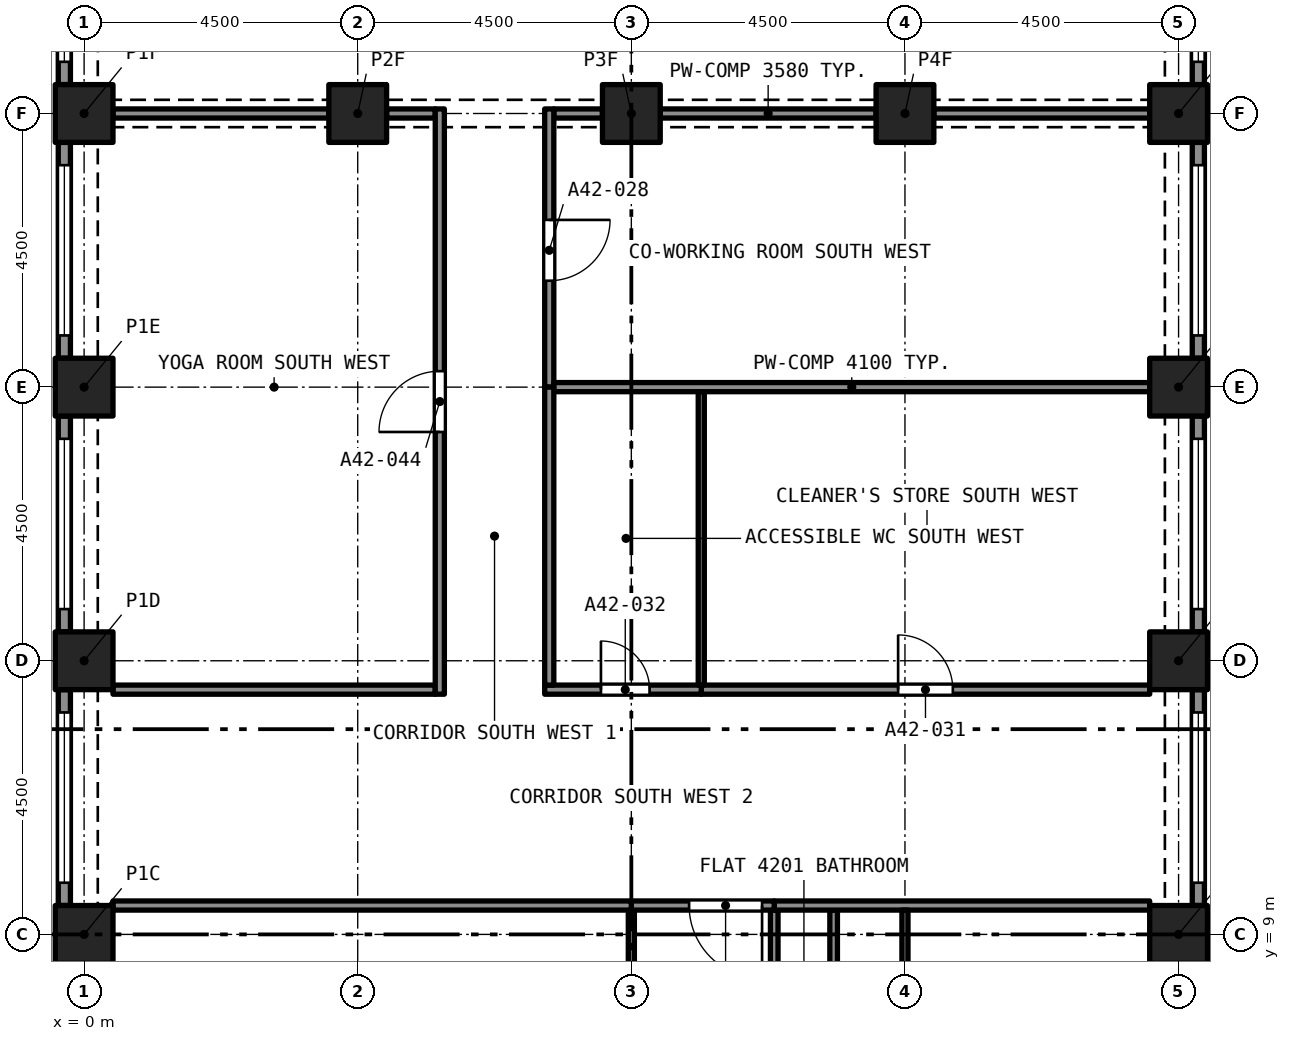
"""IFC4 building model, lengths in metres.
Left out: names, types, materials, properties, quantities, classifications, styles, units other than length and angle.
Written with IfcOpenShell. Run it as: python <this file> out.ifc"""

import sys

from ifc_helpers import new_model, si_unit, direction, frame, frame_2d, origin, origin_2d, place, context, subcontext, project, spatial, rectangle, extrude, element, fill, save


model = new_model("IFC4")
c1 = context("Model", 3, precision=1e-05, world=origin(), true_north=direction((0.0, 1.0)))
c2 = subcontext(c1, "Body", "Model", "MODEL_VIEW")
j1 = project(units=[si_unit("LENGTHUNIT", "METRE"), si_unit("PLANEANGLEUNIT", "RADIAN")], contexts=[c1])
p1 = place(None, origin())
s1 = spatial("IfcSite", under=j1, at=p1, CompositionType="ELEMENT")
p2 = place(p1, origin())
s2 = spatial("IfcBuilding", under=s1, at=p2, CompositionType="ELEMENT")
p3 = place(p2, frame((0.0, 0.0, 150.6)))
s3 = spatial("IfcBuildingStorey", under=s2, at=p3, CompositionType="ELEMENT", Elevation=150.6)
for number, where, z_axis, x_axis in (
    (1, (0.0, 9.0, 0.0), (0.0, 0.0, 1.0), (1.0, 0.0, 0.0)),
    (2, (18.0, 9.0, 0.0), (0.0, 0.0, 1.0), (1.0, 0.0, 0.0)),
    (3, (0.0, 13.5, 0.0), (0.0, 0.0, 1.0), (1.0, 0.0, 0.0)),
    (4, (18.0, 13.5, 0.0), (0.0, 0.0, 1.0), (1.0, 0.0, 0.0)),
    (5, (0.0, 18.0, 0.0), (0.0, 0.0, 1.0), (1.0, 0.0, 0.0)),
    (6, (18.0, 18.0, 0.0), (0.0, 0.0, 1.0), (1.0, 0.0, 0.0)),
    (7, (0.0, 22.5, 0.0), (0.0, 0.0, 1.0), (1.0, 0.0, 0.0)),
    (8, (4.5, 22.5, 0.0), (0.0, 0.0, 1.0), (1.0, 0.0, 0.0)),
    (9, (9.0, 22.5, 0.0), (0.0, 0.0, 1.0), (1.0, 0.0, 0.0)),
    (10, (13.5, 22.5, 0.0), (0.0, 0.0, 1.0), (1.0, 0.0, 0.0)),
    (11, (18.0, 22.5, 0.0), (0.0, 0.0, 1.0), (1.0, 0.0, 0.0)),
):
    element("IfcColumn", number, at=place(p3, frame(where, z_axis=z_axis, x_axis=x_axis)), inside=s3, PredefinedType="COLUMN", context=c2, shape_type="SweptSolid", body=[
        extrude(rectangle(XDim=0.95, YDim=0.95, at=origin_2d()), origin(), (0.0, 0.0, 1.0), 4.4),
    ])
p4 = place(p3, frame((-0.325, 22.975, 0.0), z_axis=(0.0, 0.0, 1.0), x_axis=(0.0, 1.0, 0.0)))
e12 = element("IfcWall", 12, at=p4, inside=s3, PredefinedType="SOLIDWALL", context=c2, shape_type="SweptSolid", body=[
    extrude(rectangle(XDim=3.55, YDim=0.2, at=frame_2d((1.775, 0.0))), origin(), (0.0, 0.0, 1.0), 4.4),
])
p5 = place(p4, frame((0.375, 0.0, 0.45)))
e13 = element("IfcOpeningElement", 13, at=p5, cuts=e12, PredefinedType="OPENING", context=c2, shape_type="SweptSolid", body=[
    extrude(rectangle(XDim=2.8, YDim=2.55, at=frame_2d((1.4, 1.275))), frame((0.0, 0.11, 0.0), z_axis=(0.0, -1.0, 0.0), x_axis=(1.0, 0.0, 0.0)), (0.0, 0.0, 1.0), 0.22),
])
p6 = place(p3, frame((-0.325, 18.475, 0.0), z_axis=(0.0, 0.0, 1.0), x_axis=(0.0, 1.0, 0.0)))
e14 = element("IfcWall", 14, at=p6, inside=s3, PredefinedType="SOLIDWALL", context=c2, shape_type="SweptSolid", body=[
    extrude(rectangle(XDim=3.55, YDim=0.2, at=frame_2d((1.775, 0.0))), origin(), (0.0, 0.0, 1.0), 4.4),
])
p7 = place(p6, frame((0.375, 0.0, 0.45)))
e15 = element("IfcOpeningElement", 15, at=p7, cuts=e14, PredefinedType="OPENING", context=c2, shape_type="SweptSolid", body=[
    extrude(rectangle(XDim=2.8, YDim=2.55, at=frame_2d((1.4, 1.275))), frame((0.0, 0.11, 0.0), z_axis=(0.0, -1.0, 0.0), x_axis=(1.0, 0.0, 0.0)), (0.0, 0.0, 1.0), 0.22),
])
p8 = place(p3, frame((-0.325, 13.975, 0.0), z_axis=(0.0, 0.0, 1.0), x_axis=(0.0, 1.0, 0.0)))
e16 = element("IfcWall", 16, at=p8, inside=s3, PredefinedType="SOLIDWALL", context=c2, shape_type="SweptSolid", body=[
    extrude(rectangle(XDim=3.55, YDim=0.2, at=frame_2d((1.775, 0.0))), origin(), (0.0, 0.0, 1.0), 4.4),
])
p9 = place(p8, frame((0.375, 0.0, 0.45)))
e17 = element("IfcOpeningElement", 17, at=p9, cuts=e16, PredefinedType="OPENING", context=c2, shape_type="SweptSolid", body=[
    extrude(rectangle(XDim=2.8, YDim=2.55, at=frame_2d((1.4, 1.275))), frame((0.0, 0.11, 0.0), z_axis=(0.0, -1.0, 0.0), x_axis=(1.0, 0.0, 0.0)), (0.0, 0.0, 1.0), 0.22),
])
p10 = place(p3, frame((-0.325, 9.475, 0.0), z_axis=(0.0, 0.0, 1.0), x_axis=(0.0, 1.0, 0.0)))
e18 = element("IfcWall", 18, at=p10, inside=s3, PredefinedType="SOLIDWALL", context=c2, shape_type="SweptSolid", body=[
    extrude(rectangle(XDim=3.55, YDim=0.2, at=frame_2d((1.775, 0.0))), origin(), (0.0, 0.0, 1.0), 4.4),
])
p11 = place(p10, frame((0.375, 0.0, 0.45)))
e19 = element("IfcOpeningElement", 19, at=p11, cuts=e18, PredefinedType="OPENING", context=c2, shape_type="SweptSolid", body=[
    extrude(rectangle(XDim=2.8, YDim=2.55, at=frame_2d((1.4, 1.275))), frame((0.0, 0.11, 0.0), z_axis=(0.0, -1.0, 0.0), x_axis=(1.0, 0.0, 0.0)), (0.0, 0.0, 1.0), 0.22),
])
p12 = place(p3, frame((18.325, 13.025, 0.0), z_axis=(0.0, 0.0, 1.0), x_axis=(0.0, -1.0, 0.0)))
e20 = element("IfcWall", 20, at=p12, inside=s3, PredefinedType="SOLIDWALL", context=c2, shape_type="SweptSolid", body=[
    extrude(rectangle(XDim=3.55, YDim=0.2, at=frame_2d((1.775, 0.0))), origin(), (0.0, 0.0, 1.0), 4.4),
])
p13 = place(p12, frame((0.375, 0.0, 0.45)))
e21 = element("IfcOpeningElement", 21, at=p13, cuts=e20, PredefinedType="OPENING", context=c2, shape_type="SweptSolid", body=[
    extrude(rectangle(XDim=2.8, YDim=2.55, at=frame_2d((1.4, 1.275))), frame((0.0, 0.11, 0.0), z_axis=(0.0, -1.0, 0.0), x_axis=(1.0, 0.0, 0.0)), (0.0, 0.0, 1.0), 0.22),
])
p14 = place(p3, frame((18.325, 17.525, 0.0), z_axis=(0.0, 0.0, 1.0), x_axis=(0.0, -1.0, 0.0)))
e22 = element("IfcWall", 22, at=p14, inside=s3, PredefinedType="SOLIDWALL", context=c2, shape_type="SweptSolid", body=[
    extrude(rectangle(XDim=3.55, YDim=0.2, at=frame_2d((1.775, 0.0))), origin(), (0.0, 0.0, 1.0), 4.4),
])
p15 = place(p14, frame((0.375, 0.0, 0.45)))
e23 = element("IfcOpeningElement", 23, at=p15, cuts=e22, PredefinedType="OPENING", context=c2, shape_type="SweptSolid", body=[
    extrude(rectangle(XDim=2.8, YDim=2.55, at=frame_2d((1.4, 1.275))), frame((0.0, 0.11, 0.0), z_axis=(0.0, -1.0, 0.0), x_axis=(1.0, 0.0, 0.0)), (0.0, 0.0, 1.0), 0.22),
])
p16 = place(p3, frame((18.325, 22.025, 0.0), z_axis=(0.0, 0.0, 1.0), x_axis=(0.0, -1.0, 0.0)))
e24 = element("IfcWall", 24, at=p16, inside=s3, PredefinedType="SOLIDWALL", context=c2, shape_type="SweptSolid", body=[
    extrude(rectangle(XDim=3.55, YDim=0.2, at=frame_2d((1.775, 0.0))), origin(), (0.0, 0.0, 1.0), 4.4),
])
p17 = place(p16, frame((0.375, 0.0, 0.45)))
e25 = element("IfcOpeningElement", 25, at=p17, cuts=e24, PredefinedType="OPENING", context=c2, shape_type="SweptSolid", body=[
    extrude(rectangle(XDim=2.8, YDim=2.55, at=frame_2d((1.4, 1.275))), frame((0.0, 0.11, 0.0), z_axis=(0.0, -1.0, 0.0), x_axis=(1.0, 0.0, 0.0)), (0.0, 0.0, 1.0), 0.22),
])
p18 = place(p3, frame((18.325, 26.525, 0.0), z_axis=(0.0, 0.0, 1.0), x_axis=(0.0, -1.0, 0.0)))
e26 = element("IfcWall", 26, at=p18, inside=s3, PredefinedType="SOLIDWALL", context=c2, shape_type="SweptSolid", body=[
    extrude(rectangle(XDim=3.55, YDim=0.2, at=frame_2d((1.775, 0.0))), origin(), (0.0, 0.0, 1.0), 4.4),
])
p19 = place(p18, frame((0.375, 0.0, 0.45)))
e27 = element("IfcOpeningElement", 27, at=p19, cuts=e26, PredefinedType="OPENING", context=c2, shape_type="SweptSolid", body=[
    extrude(rectangle(XDim=2.8, YDim=2.55, at=frame_2d((1.4, 1.275))), frame((0.0, 0.11, 0.0), z_axis=(0.0, -1.0, 0.0), x_axis=(1.0, 0.0, 0.0)), (0.0, 0.0, 1.0), 0.22),
])
p20 = place(p3, frame((11.35, 9.4, 0.0), z_axis=(0.0, 0.0, 1.0), x_axis=(0.0, -1.0, 0.0)))
e28 = element("IfcWall", 28, at=p20, inside=s3, PredefinedType="PARTITIONING", context=c2, shape_type="SweptSolid", body=[
    extrude(rectangle(XDim=3.448, YDim=0.125, at=frame_2d((1.724, 0.0))), origin(), (0.0, 0.0, 1.0), 4.1),
])
p21 = place(p20, frame((2.465, 0.0, 0.0)))
e29 = element("IfcOpeningElement", 29, at=p21, cuts=e28, PredefinedType="OPENING", context=c2, shape_type="SweptSolid", body=[
    extrude(rectangle(XDim=0.8, YDim=2.1, at=frame_2d((0.4, 1.05))), frame((0.0, 0.073, 0.0), z_axis=(0.0, -1.0, 0.0), x_axis=(1.0, 0.0, 0.0)), (0.0, 0.0, 1.0), 0.145),
])
p22 = place(p3, frame((12.327, 6.077, 0.0), z_axis=(0.0, 0.0, 1.0), x_axis=(0.0, 1.0, 0.0)))
e30 = element("IfcWall", 30, at=p22, inside=s3, PredefinedType="PARTITIONING", context=c2, shape_type="SweptSolid", body=[
    extrude(rectangle(XDim=3.323, YDim=0.125, at=frame_2d((1.661, 0.0))), origin(), (0.0, 0.0, 1.0), 4.1),
])
p23 = place(p3, frame((11.35, 9.475, 0.0), z_axis=(0.0, 0.0, 1.0), x_axis=(1.0, 0.0, 0.0)))
e31 = element("IfcWall", 31, at=p23, inside=s3, PredefinedType="PARTITIONING", context=c2, shape_type="SweptSolid", body=[
    extrude(rectangle(XDim=6.175, YDim=0.15, at=frame_2d((3.087, 0.0))), origin(), (0.0, 0.0, 1.0), 4.1),
])
p24 = place(p3, frame((13.5, 6.015, 0.0), z_axis=(0.0, 0.0, 1.0), x_axis=(0.0, 1.0, 0.0)))
e32 = element("IfcWall", 32, at=p24, inside=s3, PredefinedType="PARTITIONING", context=c2, shape_type="SweptSolid", body=[
    extrude(rectangle(XDim=3.385, YDim=0.1, at=frame_2d((1.692, 0.0))), origin(), (0.0, 0.0, 1.0), 4.1),
])
p25 = place(p3, frame((9.0, 4.675, 0.0), z_axis=(0.0, 0.0, 1.0), x_axis=(0.0, 1.0, 0.0)))
e33 = element("IfcWall", 33, at=p25, inside=s3, PredefinedType="PARTITIONING", context=c2, shape_type="SweptSolid", body=[
    extrude(rectangle(XDim=4.725, YDim=0.1, at=frame_2d((2.362, 0.0))), origin(), (0.0, 0.0, 1.0), 4.1),
])
p26 = place(p25, frame((0.13, 0.0, 0.0)))
e34 = element("IfcOpeningElement", 34, at=p26, cuts=e33, PredefinedType="OPENING", context=c2, shape_type="SweptSolid", body=[
    extrude(rectangle(XDim=1.6, YDim=2.1, at=frame_2d((0.8, 1.05))), frame((0.0, 0.06, 0.0), z_axis=(0.0, -1.0, 0.0), x_axis=(1.0, 0.0, 0.0)), (0.0, 0.0, 1.0), 0.12),
])
p27 = place(p3, frame((11.35, 9.475, 0.0), z_axis=(0.0, 0.0, 1.0), x_axis=(-1.0, 0.0, 0.0)))
e35 = element("IfcWall", 35, at=p27, inside=s3, PredefinedType="PARTITIONING", context=c2, shape_type="SweptSolid", body=[
    extrude(rectangle(XDim=2.35, YDim=0.15, at=frame_2d((1.175, 0.0))), origin(), (0.0, 0.0, 1.0), 4.1),
])
p28 = place(p27, frame((0.2, 0.0, 0.0)))
e36 = element("IfcOpeningElement", 36, at=p28, cuts=e35, PredefinedType="OPENING", context=c2, shape_type="SweptSolid", body=[
    extrude(rectangle(XDim=1.2, YDim=2.4, at=frame_2d((0.6, 1.2))), frame((0.0, 0.085, 0.0), z_axis=(0.0, -1.0, 0.0), x_axis=(1.0, 0.0, 0.0)), (0.0, 0.0, 1.0), 0.17),
])
p29 = place(p3, frame((0.475, 9.475, 0.0), z_axis=(0.0, 0.0, 1.0), x_axis=(1.0, 0.0, 0.0)))
e37 = element("IfcWall", 37, at=p29, inside=s3, PredefinedType="PARTITIONING", context=c2, shape_type="SweptSolid", body=[
    extrude(rectangle(XDim=8.525, YDim=0.15, at=frame_2d((4.262, 0.0))), origin(), (0.0, 0.0, 1.0), 4.1),
])
p30 = place(p3, frame((7.725, 22.5, 0.0), z_axis=(0.0, 0.0, 1.0), x_axis=(1.0, 0.0, 0.0)))
e38 = element("IfcWall", 38, at=p30, inside=s3, PredefinedType="PARTITIONING", context=c2, shape_type="SweptSolid", body=[
    extrude(rectangle(XDim=0.8, YDim=0.15, at=frame_2d((0.4, 0.0))), origin(), (0.0, 0.0, 1.0), 3.58),
])
for number, where, z_axis, x_axis in (
    (39, (9.475, 22.5, 0.0), (0.0, 0.0, 1.0), (1.0, 0.0, 0.0)),
    (40, (13.975, 22.5, 0.0), (0.0, 0.0, 1.0), (1.0, 0.0, 0.0)),
):
    element("IfcWall", number, at=place(p3, frame(where, z_axis=z_axis, x_axis=x_axis)), inside=s3, PredefinedType="PARTITIONING", context=c2, shape_type="SweptSolid", body=[
        extrude(rectangle(XDim=3.55, YDim=0.15, at=frame_2d((1.775, 0.0))), origin(), (0.0, 0.0, 1.0), 3.58),
    ])
p31 = place(p3, frame((7.65, 22.575, 0.0), z_axis=(0.0, 0.0, 1.0), x_axis=(0.0, -1.0, 0.0)))
e41 = element("IfcWall", 41, at=p31, inside=s3, PredefinedType="PARTITIONING", context=c2, shape_type="SweptSolid", body=[
    extrude(rectangle(XDim=4.575, YDim=0.15, at=frame_2d((2.288, 0.0))), origin(), (0.0, 0.0, 1.0), 4.1),
])
p32 = place(p31, frame((1.825, 0.0, 0.0)))
e42 = element("IfcOpeningElement", 42, at=p32, cuts=e41, PredefinedType="OPENING", context=c2, shape_type="SweptSolid", body=[
    extrude(rectangle(XDim=1.0, YDim=2.1, at=frame_2d((0.5, 1.05))), frame((0.0, 0.085, 0.0), z_axis=(0.0, -1.0, 0.0), x_axis=(1.0, 0.0, 0.0)), (0.0, 0.0, 1.0), 0.17),
])
p33 = place(p3, frame((7.725, 18.0, 0.0), z_axis=(0.0, 0.0, 1.0), x_axis=(1.0, 0.0, 0.0)))
e43 = element("IfcWall", 43, at=p33, inside=s3, PredefinedType="PARTITIONING", context=c2, shape_type="SweptSolid", body=[
    extrude(rectangle(XDim=9.8, YDim=0.15, at=frame_2d((4.9, 0.0))), origin(), (0.0, 0.0, 1.0), 4.1),
])
p34 = place(p3, frame((10.15, 13.025, 0.0), z_axis=(0.0, 0.0, 1.0), x_axis=(1.0, 0.0, 0.0)))
e44 = element("IfcWall", 44, at=p34, inside=s3, PredefinedType="PARTITIONING", context=c2, shape_type="SweptSolid", body=[
    extrude(rectangle(XDim=7.375, YDim=0.15, at=frame_2d((3.688, 0.0))), origin(), (0.0, 0.0, 1.0), 4.1),
])
p35 = place(p34, frame((3.238, 0.0, 0.0)))
e45 = element("IfcOpeningElement", 45, at=p35, cuts=e44, PredefinedType="OPENING", context=c2, shape_type="SweptSolid", body=[
    extrude(rectangle(XDim=0.9, YDim=2.1, at=frame_2d((0.45, 1.05))), frame((0.0, 0.085, 0.0), z_axis=(0.0, -1.0, 0.0), x_axis=(1.0, 0.0, 0.0)), (0.0, 0.0, 1.0), 0.17),
])
p36 = place(p3, frame((7.575, 13.025, 0.0), z_axis=(0.0, 0.0, 1.0), x_axis=(1.0, 0.0, 0.0)))
e46 = element("IfcWall", 46, at=p36, inside=s3, PredefinedType="PARTITIONING", context=c2, shape_type="SweptSolid", body=[
    extrude(rectangle(XDim=2.575, YDim=0.15, at=frame_2d((1.288, 0.0))), origin(), (0.0, 0.0, 1.0), 4.1),
])
p37 = place(p36, frame((0.925, 0.0, 0.0)))
e47 = element("IfcOpeningElement", 47, at=p37, cuts=e46, PredefinedType="OPENING", context=c2, shape_type="SweptSolid", body=[
    extrude(rectangle(XDim=0.8, YDim=2.1, at=frame_2d((0.4, 1.05))), frame((0.0, 0.085, 0.0), z_axis=(0.0, -1.0, 0.0), x_axis=(1.0, 0.0, 0.0)), (0.0, 0.0, 1.0), 0.17),
])
p38 = place(p3, frame((0.475, 13.025, 0.0), z_axis=(0.0, 0.0, 1.0), x_axis=(1.0, 0.0, 0.0)))
e48 = element("IfcWall", 48, at=p38, inside=s3, PredefinedType="PARTITIONING", context=c2, shape_type="SweptSolid", body=[
    extrude(rectangle(XDim=5.3, YDim=0.15, at=frame_2d((2.65, 0.0))), origin(), (0.0, 0.0, 1.0), 4.1),
])
p39 = place(p3, frame((4.975, 22.5, 0.0), z_axis=(0.0, 0.0, 1.0), x_axis=(1.0, 0.0, 0.0)))
e49 = element("IfcWall", 49, at=p39, inside=s3, PredefinedType="PARTITIONING", context=c2, shape_type="SweptSolid", body=[
    extrude(rectangle(XDim=0.8, YDim=0.15, at=frame_2d((0.4, 0.0))), origin(), (0.0, 0.0, 1.0), 3.58),
])
p40 = place(p3, frame((0.475, 22.5, 0.0), z_axis=(0.0, 0.0, 1.0), x_axis=(1.0, 0.0, 0.0)))
e50 = element("IfcWall", 50, at=p40, inside=s3, PredefinedType="PARTITIONING", context=c2, shape_type="SweptSolid", body=[
    extrude(rectangle(XDim=3.55, YDim=0.15, at=frame_2d((1.775, 0.0))), origin(), (0.0, 0.0, 1.0), 3.58),
])
p41 = place(p3, frame((7.65, 13.1, 0.0), z_axis=(0.0, 0.0, 1.0), x_axis=(0.0, 1.0, 0.0)))
e51 = element("IfcWall", 51, at=p41, inside=s3, PredefinedType="PARTITIONING", context=c2, shape_type="SweptSolid", body=[
    extrude(rectangle(XDim=4.9, YDim=0.15, at=frame_2d((2.45, 0.0))), origin(), (0.0, 0.0, 1.0), 4.1),
])
p42 = place(p3, frame((5.85, 12.95, 0.0), z_axis=(0.0, 0.0, 1.0), x_axis=(0.0, 1.0, 0.0)))
e52 = element("IfcWall", 52, at=p42, inside=s3, PredefinedType="PARTITIONING", context=c2, shape_type="SweptSolid", body=[
    extrude(rectangle(XDim=9.625, YDim=0.15, at=frame_2d((4.812, 0.0))), origin(), (0.0, 0.0, 1.0), 4.1),
])
p43 = place(p42, frame((4.312, 0.0, 0.0)))
e53 = element("IfcOpeningElement", 53, at=p43, cuts=e52, PredefinedType="OPENING", context=c2, shape_type="SweptSolid", body=[
    extrude(rectangle(XDim=1.0, YDim=2.1, at=frame_2d((0.5, 1.05))), frame((0.0, 0.085, 0.0), z_axis=(0.0, -1.0, 0.0), x_axis=(1.0, 0.0, 0.0)), (0.0, 0.0, 1.0), 0.17),
])
p44 = place(p3, frame((10.15, 13.1, 0.0), z_axis=(0.0, 0.0, 1.0), x_axis=(0.0, 1.0, 0.0)))
e54 = element("IfcWall", 54, at=p44, inside=s3, PredefinedType="PARTITIONING", context=c2, shape_type="SweptSolid", body=[
    extrude(rectangle(XDim=4.825, YDim=0.1, at=frame_2d((2.413, 0.0))), origin(), (0.0, 0.0, 1.0), 4.1),
])
p45 = place(p5, origin())
e55 = element("IfcWindow", 55, at=p45, inside=s3, PartitioningType="SINGLE_PANEL", PredefinedType="WINDOW", context=c2, shape_type="SweptSolid", body=[
    extrude(rectangle(XDim=2.8, YDim=2.55, at=frame_2d((1.4, 1.275))), frame((0.0, 0.03, 0.0), z_axis=(0.0, -1.0, 0.0), x_axis=(1.0, 0.0, 0.0)), (0.0, 0.0, 1.0), 0.06),
])
fill(e13, e55)
p46 = place(p7, origin())
e56 = element("IfcWindow", 56, at=p46, inside=s3, PartitioningType="SINGLE_PANEL", PredefinedType="WINDOW", context=c2, shape_type="SweptSolid", body=[
    extrude(rectangle(XDim=2.8, YDim=2.55, at=frame_2d((1.4, 1.275))), frame((0.0, 0.03, 0.0), z_axis=(0.0, -1.0, 0.0), x_axis=(1.0, 0.0, 0.0)), (0.0, 0.0, 1.0), 0.06),
])
fill(e15, e56)
p47 = place(p9, origin())
e57 = element("IfcWindow", 57, at=p47, inside=s3, PartitioningType="SINGLE_PANEL", PredefinedType="WINDOW", context=c2, shape_type="SweptSolid", body=[
    extrude(rectangle(XDim=2.8, YDim=2.55, at=frame_2d((1.4, 1.275))), frame((0.0, 0.03, 0.0), z_axis=(0.0, -1.0, 0.0), x_axis=(1.0, 0.0, 0.0)), (0.0, 0.0, 1.0), 0.06),
])
fill(e17, e57)
p48 = place(p11, origin())
e58 = element("IfcWindow", 58, at=p48, inside=s3, PartitioningType="SINGLE_PANEL", PredefinedType="WINDOW", context=c2, shape_type="SweptSolid", body=[
    extrude(rectangle(XDim=2.8, YDim=2.55, at=frame_2d((1.4, 1.275))), frame((0.0, 0.03, 0.0), z_axis=(0.0, -1.0, 0.0), x_axis=(1.0, 0.0, 0.0)), (0.0, 0.0, 1.0), 0.06),
])
fill(e19, e58)
p49 = place(p13, origin())
e59 = element("IfcWindow", 59, at=p49, inside=s3, PartitioningType="SINGLE_PANEL", PredefinedType="WINDOW", context=c2, shape_type="SweptSolid", body=[
    extrude(rectangle(XDim=2.8, YDim=2.55, at=frame_2d((1.4, 1.275))), frame((0.0, 0.03, 0.0), z_axis=(0.0, -1.0, 0.0), x_axis=(1.0, 0.0, 0.0)), (0.0, 0.0, 1.0), 0.06),
])
fill(e21, e59)
p50 = place(p15, origin())
e60 = element("IfcWindow", 60, at=p50, inside=s3, PartitioningType="SINGLE_PANEL", PredefinedType="WINDOW", context=c2, shape_type="SweptSolid", body=[
    extrude(rectangle(XDim=2.8, YDim=2.55, at=frame_2d((1.4, 1.275))), frame((0.0, 0.03, 0.0), z_axis=(0.0, -1.0, 0.0), x_axis=(1.0, 0.0, 0.0)), (0.0, 0.0, 1.0), 0.06),
])
fill(e23, e60)
p51 = place(p17, origin())
e61 = element("IfcWindow", 61, at=p51, inside=s3, PartitioningType="SINGLE_PANEL", PredefinedType="WINDOW", context=c2, shape_type="SweptSolid", body=[
    extrude(rectangle(XDim=2.8, YDim=2.55, at=frame_2d((1.4, 1.275))), frame((0.0, 0.03, 0.0), z_axis=(0.0, -1.0, 0.0), x_axis=(1.0, 0.0, 0.0)), (0.0, 0.0, 1.0), 0.06),
])
fill(e25, e61)
p52 = place(p19, origin())
e62 = element("IfcWindow", 62, at=p52, inside=s3, PartitioningType="SINGLE_PANEL", PredefinedType="WINDOW", context=c2, shape_type="SweptSolid", body=[
    extrude(rectangle(XDim=2.8, YDim=2.55, at=frame_2d((1.4, 1.275))), frame((0.0, 0.03, 0.0), z_axis=(0.0, -1.0, 0.0), x_axis=(1.0, 0.0, 0.0)), (0.0, 0.0, 1.0), 0.06),
])
fill(e27, e62)
p53 = place(p28, origin())
e63 = element("IfcDoor", 63, at=p53, inside=s3, OperationType="SINGLE_SWING_LEFT", PredefinedType="DOOR", context=c2, shape_type="SweptSolid", body=[
    extrude(rectangle(XDim=1.2, YDim=2.4, at=frame_2d((0.6, 1.2))), frame((0.0, 0.025, 0.0), z_axis=(0.0, -1.0, 0.0), x_axis=(1.0, 0.0, 0.0)), (0.0, 0.0, 1.0), 0.05),
])
fill(e36, e63)
p54 = place(p32, origin())
e64 = element("IfcDoor", 64, at=p54, inside=s3, OperationType="SINGLE_SWING_RIGHT", PredefinedType="DOOR", context=c2, shape_type="SweptSolid", body=[
    extrude(rectangle(XDim=1.0, YDim=2.1, at=frame_2d((0.5, 1.05))), frame((0.0, 0.025, 0.0), z_axis=(0.0, -1.0, 0.0), x_axis=(1.0, 0.0, 0.0)), (0.0, 0.0, 1.0), 0.05),
])
fill(e42, e64)
p55 = place(p35, origin())
e65 = element("IfcDoor", 65, at=p55, inside=s3, OperationType="SINGLE_SWING_LEFT", PredefinedType="DOOR", context=c2, shape_type="SweptSolid", body=[
    extrude(rectangle(XDim=0.9, YDim=2.1, at=frame_2d((0.45, 1.05))), frame((0.0, 0.025, 0.0), z_axis=(0.0, -1.0, 0.0), x_axis=(1.0, 0.0, 0.0)), (0.0, 0.0, 1.0), 0.05),
])
fill(e45, e65)
p56 = place(p37, origin())
e66 = element("IfcDoor", 66, at=p56, inside=s3, OperationType="SINGLE_SWING_RIGHT", PredefinedType="DOOR", context=c2, shape_type="SweptSolid", body=[
    extrude(rectangle(XDim=0.8, YDim=2.1, at=frame_2d((0.4, 1.05))), frame((0.0, 0.025, 0.0), z_axis=(0.0, -1.0, 0.0), x_axis=(1.0, 0.0, 0.0)), (0.0, 0.0, 1.0), 0.05),
])
fill(e47, e66)
p57 = place(p43, origin())
e67 = element("IfcDoor", 67, at=p57, inside=s3, OperationType="SINGLE_SWING_RIGHT", PredefinedType="DOOR", context=c2, shape_type="SweptSolid", body=[
    extrude(rectangle(XDim=1.0, YDim=2.1, at=frame_2d((0.5, 1.05))), frame((0.0, 0.025, 0.0), z_axis=(0.0, -1.0, 0.0), x_axis=(1.0, 0.0, 0.0)), (0.0, 0.0, 1.0), 0.05),
])
fill(e53, e67)
save(model, sys.argv[1])
